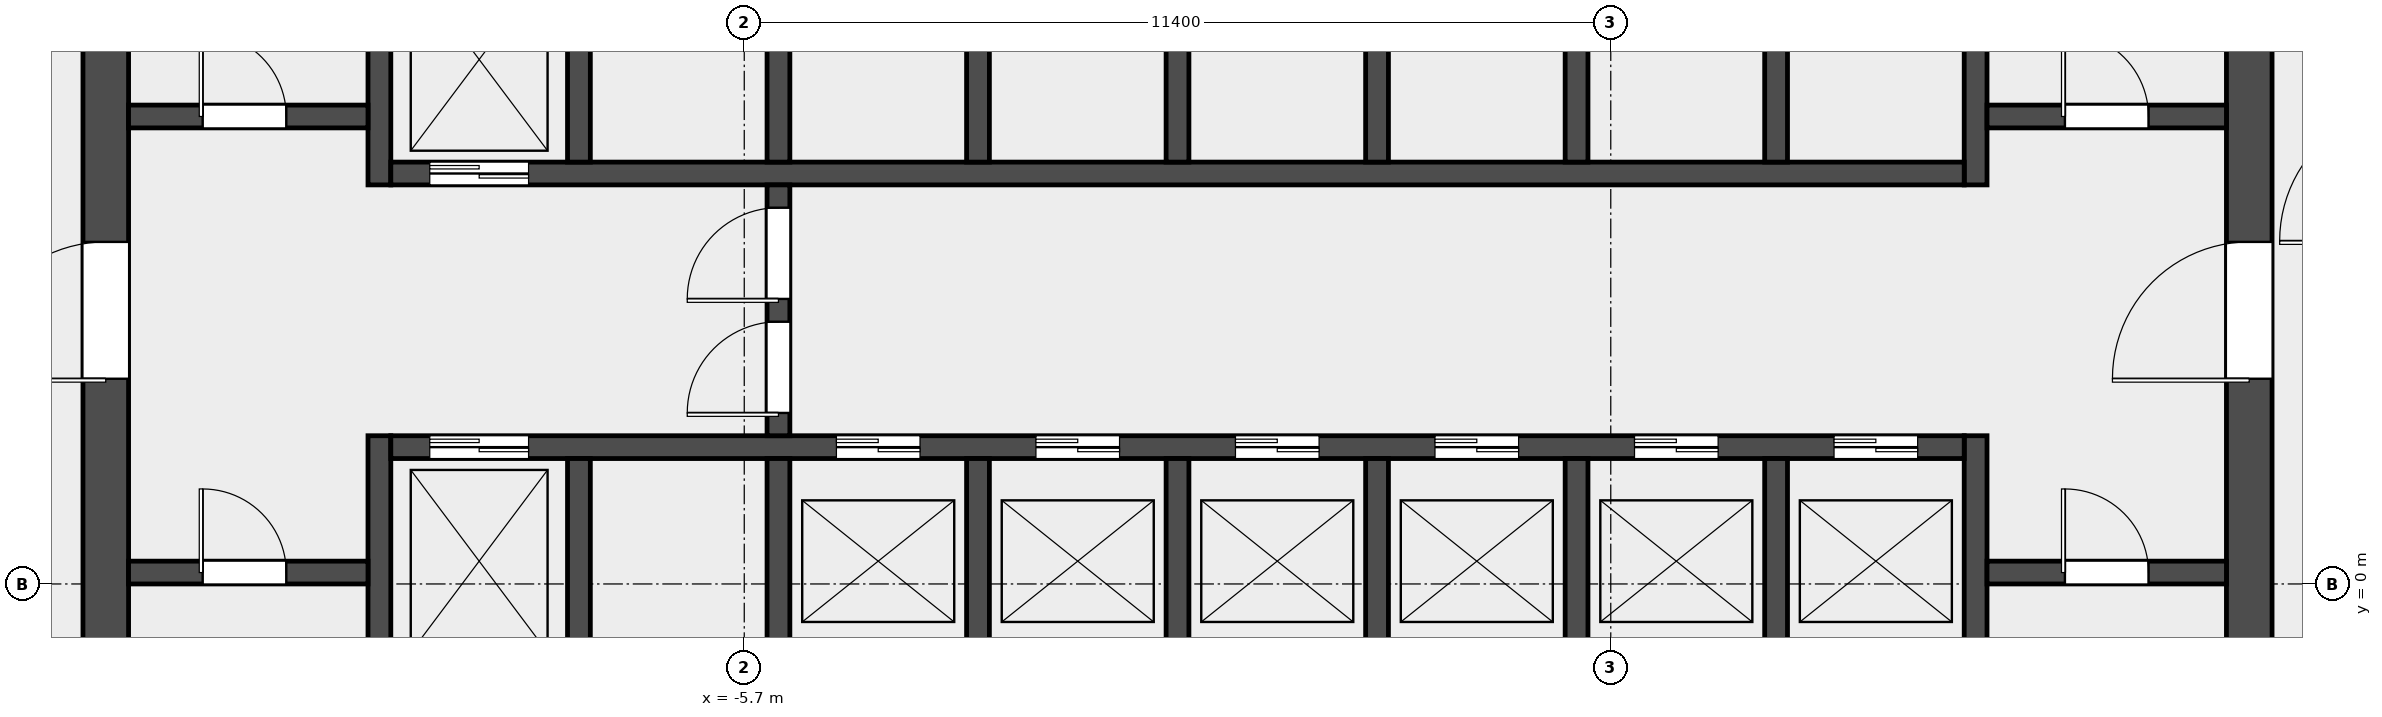
"""IFC4 building model, lengths in metres.
Left out: names, types, materials, properties, quantities, classifications, styles, units other than length and angle.
Written with IfcOpenShell. Run it as: python <this file> out.ifc"""

import sys

from ifc_helpers import new_model, si_unit, direction, frame, frame_2d, origin, place, context, subcontext, project, spatial, rectangle, extrude, element, fill, save


model = new_model("IFC4")
c1 = context("Model", 3, precision=1e-05, world=origin(), true_north=direction((0.0, 1.0)))
c2 = subcontext(c1, "Body", "Model", "MODEL_VIEW")
j1 = project(units=[si_unit("LENGTHUNIT", "METRE"), si_unit("PLANEANGLEUNIT", "RADIAN")], contexts=[c1])
p1 = place(None, origin())
s1 = spatial("IfcSite", under=j1, at=p1, CompositionType="ELEMENT")
p2 = place(p1, origin())
s2 = spatial("IfcBuilding", under=s1, at=p2, CompositionType="ELEMENT")
p3 = place(p2, frame((0.0, 0.0, 108.1)))
s3 = spatial("IfcBuildingStorey", under=s2, at=p3, CompositionType="ELEMENT", Elevation=108.1)
p4 = place(p3, frame((-14.1, -6.6, 0.0), z_axis=(0.0, 0.0, 1.0), x_axis=(0.0, 1.0, 0.0)))
e1 = element("IfcWall", 1, at=p4, inside=s3, PredefinedType="SHEAR", context=c2, shape_type="SweptSolid", body=[
    extrude(rectangle(XDim=19.5, YDim=0.6, at=frame_2d((9.75, 0.0))), origin(), (0.0, 0.0, 1.0), 4.2),
])
p5 = place(p4, frame((9.3, 0.0, 0.0)))
e2 = element("IfcOpeningElement", 2, at=p5, cuts=e1, PredefinedType="OPENING", context=c2, shape_type="SweptSolid", body=[
    extrude(rectangle(XDim=1.8, YDim=2.1, at=frame_2d((0.9, 1.05))), frame((0.0, 0.312, 0.0), z_axis=(0.0, -1.0, 0.0), x_axis=(1.0, 0.0, 0.0)), (0.0, 0.0, 1.0), 0.624),
])
p6 = place(p3, frame((14.1, -6.6, 0.0), z_axis=(0.0, 0.0, 1.0), x_axis=(0.0, 1.0, 0.0)))
e3 = element("IfcWall", 3, at=p6, inside=s3, PredefinedType="SHEAR", context=c2, shape_type="SweptSolid", body=[
    extrude(rectangle(XDim=19.5, YDim=0.6, at=frame_2d((9.75, 0.0))), origin(), (0.0, 0.0, 1.0), 4.2),
])
p7 = place(p6, frame((9.3, 0.0, 0.0)))
e4 = element("IfcOpeningElement", 4, at=p7, cuts=e3, PredefinedType="OPENING", context=c2, shape_type="SweptSolid", body=[
    extrude(rectangle(XDim=1.8, YDim=2.1, at=frame_2d((0.9, 1.05))), frame((0.0, 0.312, 0.0), z_axis=(0.0, -1.0, 0.0), x_axis=(1.0, 0.0, 0.0)), (0.0, 0.0, 1.0), 0.624),
])
p8 = place(p3, frame((-10.5, -6.6, 0.0), z_axis=(0.0, 0.0, 1.0), x_axis=(0.0, 1.0, 0.0)))
e5 = element("IfcWall", 5, at=p8, inside=s3, PredefinedType="SHEAR", context=c2, shape_type="SweptSolid", body=[
    extrude(rectangle(XDim=8.55, YDim=0.3, at=frame_2d((4.275, 0.0))), origin(), (0.0, 0.0, 1.0), 4.2),
])
p9 = place(p3, frame((-10.5, 5.25, 0.0), z_axis=(0.0, 0.0, 1.0), x_axis=(0.0, 1.0, 0.0)))
e6 = element("IfcWall", 6, at=p9, inside=s3, PredefinedType="SHEAR", context=c2, shape_type="SweptSolid", body=[
    extrude(rectangle(XDim=7.65, YDim=0.3, at=frame_2d((3.825, 0.0))), origin(), (0.0, 0.0, 1.0), 4.2),
])
p10 = place(p3, frame((10.5, -6.6, 0.0), z_axis=(0.0, 0.0, 1.0), x_axis=(0.0, 1.0, 0.0)))
e7 = element("IfcWall", 7, at=p10, inside=s3, PredefinedType="SHEAR", context=c2, shape_type="SweptSolid", body=[
    extrude(rectangle(XDim=8.55, YDim=0.3, at=frame_2d((4.275, 0.0))), origin(), (0.0, 0.0, 1.0), 4.2),
])
p11 = place(p3, frame((10.5, 5.25, 0.0), z_axis=(0.0, 0.0, 1.0), x_axis=(0.0, 1.0, 0.0)))
e8 = element("IfcWall", 8, at=p11, inside=s3, PredefinedType="SHEAR", context=c2, shape_type="SweptSolid", body=[
    extrude(rectangle(XDim=7.65, YDim=0.3, at=frame_2d((3.825, 0.0))), origin(), (0.0, 0.0, 1.0), 4.2),
])
p12 = place(p3, frame((-13.8, 0.15, 0.0), z_axis=(0.0, 0.0, 1.0), x_axis=(1.0, 0.0, 0.0)))
e9 = element("IfcWall", 9, at=p12, inside=s3, PredefinedType="SOLIDWALL", context=c2, shape_type="SweptSolid", body=[
    extrude(rectangle(XDim=3.15, YDim=0.3, at=frame_2d((1.575, 0.0))), origin(), (0.0, 0.0, 1.0), 4.2),
])
p13 = place(p12, frame((0.975, 0.0, 0.0)))
e10 = element("IfcOpeningElement", 10, at=p13, cuts=e9, PredefinedType="OPENING", context=c2, shape_type="SweptSolid", body=[
    extrude(rectangle(XDim=1.1, YDim=2.1, at=frame_2d((0.55, 1.05))), frame((0.0, 0.162, 0.0), z_axis=(0.0, -1.0, 0.0), x_axis=(1.0, 0.0, 0.0)), (0.0, 0.0, 1.0), 0.324),
])
p14 = place(p3, frame((-13.8, 6.15, 0.0), z_axis=(0.0, 0.0, 1.0), x_axis=(1.0, 0.0, 0.0)))
e11 = element("IfcWall", 11, at=p14, inside=s3, PredefinedType="SOLIDWALL", context=c2, shape_type="SweptSolid", body=[
    extrude(rectangle(XDim=3.15, YDim=0.3, at=frame_2d((1.575, 0.0))), origin(), (0.0, 0.0, 1.0), 4.2),
])
p15 = place(p14, frame((0.975, 0.0, 0.0)))
e12 = element("IfcOpeningElement", 12, at=p15, cuts=e11, PredefinedType="OPENING", context=c2, shape_type="SweptSolid", body=[
    extrude(rectangle(XDim=1.1, YDim=2.1, at=frame_2d((0.55, 1.05))), frame((0.0, 0.162, 0.0), z_axis=(0.0, -1.0, 0.0), x_axis=(1.0, 0.0, 0.0)), (0.0, 0.0, 1.0), 0.324),
])
p16 = place(p3, frame((10.65, 0.15, 0.0), z_axis=(0.0, 0.0, 1.0), x_axis=(1.0, 0.0, 0.0)))
e13 = element("IfcWall", 13, at=p16, inside=s3, PredefinedType="SOLIDWALL", context=c2, shape_type="SweptSolid", body=[
    extrude(rectangle(XDim=3.15, YDim=0.3, at=frame_2d((1.575, 0.0))), origin(), (0.0, 0.0, 1.0), 4.2),
])
p17 = place(p16, frame((1.025, 0.0, 0.0)))
e14 = element("IfcOpeningElement", 14, at=p17, cuts=e13, PredefinedType="OPENING", context=c2, shape_type="SweptSolid", body=[
    extrude(rectangle(XDim=1.1, YDim=2.1, at=frame_2d((0.55, 1.05))), frame((0.0, 0.162, 0.0), z_axis=(0.0, -1.0, 0.0), x_axis=(1.0, 0.0, 0.0)), (0.0, 0.0, 1.0), 0.324),
])
p18 = place(p3, frame((10.65, 6.15, 0.0), z_axis=(0.0, 0.0, 1.0), x_axis=(1.0, 0.0, 0.0)))
e15 = element("IfcWall", 15, at=p18, inside=s3, PredefinedType="SOLIDWALL", context=c2, shape_type="SweptSolid", body=[
    extrude(rectangle(XDim=3.15, YDim=0.3, at=frame_2d((1.575, 0.0))), origin(), (0.0, 0.0, 1.0), 4.2),
])
p19 = place(p18, frame((1.025, 0.0, 0.0)))
e16 = element("IfcOpeningElement", 16, at=p19, cuts=e15, PredefinedType="OPENING", context=c2, shape_type="SweptSolid", body=[
    extrude(rectangle(XDim=1.1, YDim=2.1, at=frame_2d((0.55, 1.05))), frame((0.0, 0.162, 0.0), z_axis=(0.0, -1.0, 0.0), x_axis=(1.0, 0.0, 0.0)), (0.0, 0.0, 1.0), 0.324),
])
p20 = place(p3, frame((-10.35, 1.8, 0.0), z_axis=(0.0, 0.0, 1.0), x_axis=(1.0, 0.0, 0.0)))
e17 = element("IfcWall", 17, at=p20, inside=s3, PredefinedType="SOLIDWALL", context=c2, shape_type="SweptSolid", body=[
    extrude(rectangle(XDim=20.7, YDim=0.3, at=frame_2d((10.35, 0.0))), origin(), (0.0, 0.0, 1.0), 4.2),
])
p21 = place(p20, frame((0.512, 0.0, 0.0)))
e18 = element("IfcOpeningElement", 18, at=p21, cuts=e17, PredefinedType="OPENING", context=c2, shape_type="SweptSolid", body=[
    extrude(rectangle(XDim=1.3, YDim=2.1, at=frame_2d((0.65, 1.05))), frame((0.0, 0.162, 0.0), z_axis=(0.0, -1.0, 0.0), x_axis=(1.0, 0.0, 0.0)), (0.0, 0.0, 1.0), 0.324),
])
p22 = place(p20, frame((5.863, 0.0, 0.0)))
e19 = element("IfcOpeningElement", 19, at=p22, cuts=e17, PredefinedType="OPENING", context=c2, shape_type="SweptSolid", body=[
    extrude(rectangle(XDim=1.1, YDim=2.1, at=frame_2d((0.55, 1.05))), frame((0.0, 0.162, 0.0), z_axis=(0.0, -1.0, 0.0), x_axis=(1.0, 0.0, 0.0)), (0.0, 0.0, 1.0), 0.324),
])
p23 = place(p20, frame((8.488, 0.0, 0.0)))
e20 = element("IfcOpeningElement", 20, at=p23, cuts=e17, PredefinedType="OPENING", context=c2, shape_type="SweptSolid", body=[
    extrude(rectangle(XDim=1.1, YDim=2.1, at=frame_2d((0.55, 1.05))), frame((0.0, 0.162, 0.0), z_axis=(0.0, -1.0, 0.0), x_axis=(1.0, 0.0, 0.0)), (0.0, 0.0, 1.0), 0.324),
])
p24 = place(p20, frame((11.113, 0.0, 0.0)))
e21 = element("IfcOpeningElement", 21, at=p24, cuts=e17, PredefinedType="OPENING", context=c2, shape_type="SweptSolid", body=[
    extrude(rectangle(XDim=1.1, YDim=2.1, at=frame_2d((0.55, 1.05))), frame((0.0, 0.162, 0.0), z_axis=(0.0, -1.0, 0.0), x_axis=(1.0, 0.0, 0.0)), (0.0, 0.0, 1.0), 0.324),
])
p25 = place(p20, frame((13.738, 0.0, 0.0)))
e22 = element("IfcOpeningElement", 22, at=p25, cuts=e17, PredefinedType="OPENING", context=c2, shape_type="SweptSolid", body=[
    extrude(rectangle(XDim=1.1, YDim=2.1, at=frame_2d((0.55, 1.05))), frame((0.0, 0.162, 0.0), z_axis=(0.0, -1.0, 0.0), x_axis=(1.0, 0.0, 0.0)), (0.0, 0.0, 1.0), 0.324),
])
p26 = place(p20, frame((16.363, 0.0, 0.0)))
e23 = element("IfcOpeningElement", 23, at=p26, cuts=e17, PredefinedType="OPENING", context=c2, shape_type="SweptSolid", body=[
    extrude(rectangle(XDim=1.1, YDim=2.1, at=frame_2d((0.55, 1.05))), frame((0.0, 0.162, 0.0), z_axis=(0.0, -1.0, 0.0), x_axis=(1.0, 0.0, 0.0)), (0.0, 0.0, 1.0), 0.324),
])
p27 = place(p20, frame((18.988, 0.0, 0.0)))
e24 = element("IfcOpeningElement", 24, at=p27, cuts=e17, PredefinedType="OPENING", context=c2, shape_type="SweptSolid", body=[
    extrude(rectangle(XDim=1.1, YDim=2.1, at=frame_2d((0.55, 1.05))), frame((0.0, 0.162, 0.0), z_axis=(0.0, -1.0, 0.0), x_axis=(1.0, 0.0, 0.0)), (0.0, 0.0, 1.0), 0.324),
])
p28 = place(p3, frame((-10.35, 5.4, 0.0), z_axis=(0.0, 0.0, 1.0), x_axis=(1.0, 0.0, 0.0)))
e25 = element("IfcWall", 25, at=p28, inside=s3, PredefinedType="SOLIDWALL", context=c2, shape_type="SweptSolid", body=[
    extrude(rectangle(XDim=20.7, YDim=0.3, at=frame_2d((10.35, 0.0))), origin(), (0.0, 0.0, 1.0), 4.2),
])
p29 = place(p28, frame((0.512, 0.0, 0.0)))
e26 = element("IfcOpeningElement", 26, at=p29, cuts=e25, PredefinedType="OPENING", context=c2, shape_type="SweptSolid", body=[
    extrude(rectangle(XDim=1.3, YDim=2.1, at=frame_2d((0.65, 1.05))), frame((0.0, 0.162, 0.0), z_axis=(0.0, -1.0, 0.0), x_axis=(1.0, 0.0, 0.0)), (0.0, 0.0, 1.0), 0.324),
])
for number, where, z_axis, x_axis in (
    (27, (-7.875, -1.05, 0.0), (0.0, 0.0, 1.0), (0.0, 1.0, 0.0)),
    (28, (-5.25, -1.05, 0.0), (0.0, 0.0, 1.0), (0.0, 1.0, 0.0)),
    (29, (-2.625, -1.05, 0.0), (0.0, 0.0, 1.0), (0.0, 1.0, 0.0)),
    (30, (0.0, -1.05, 0.0), (0.0, 0.0, 1.0), (0.0, 1.0, 0.0)),
    (31, (2.625, -1.05, 0.0), (0.0, 0.0, 1.0), (0.0, 1.0, 0.0)),
    (32, (5.25, -1.05, 0.0), (0.0, 0.0, 1.0), (0.0, 1.0, 0.0)),
    (33, (7.875, -1.05, 0.0), (0.0, 0.0, 1.0), (0.0, 1.0, 0.0)),
    (34, (-7.875, 5.55, 0.0), (0.0, 0.0, 1.0), (0.0, 1.0, 0.0)),
    (35, (-5.25, 5.55, 0.0), (0.0, 0.0, 1.0), (0.0, 1.0, 0.0)),
    (36, (-2.625, 5.55, 0.0), (0.0, 0.0, 1.0), (0.0, 1.0, 0.0)),
    (37, (0.0, 5.55, 0.0), (0.0, 0.0, 1.0), (0.0, 1.0, 0.0)),
    (38, (2.625, 5.55, 0.0), (0.0, 0.0, 1.0), (0.0, 1.0, 0.0)),
    (39, (5.25, 5.55, 0.0), (0.0, 0.0, 1.0), (0.0, 1.0, 0.0)),
    (40, (7.875, 5.55, 0.0), (0.0, 0.0, 1.0), (0.0, 1.0, 0.0)),
):
    element("IfcWall", number, at=place(p3, frame(where, z_axis=z_axis, x_axis=x_axis)), inside=s3, PredefinedType="SOLIDWALL", context=c2, shape_type="SweptSolid", body=[
        extrude(rectangle(XDim=2.7, YDim=0.3, at=frame_2d((1.35, 0.0))), origin(), (0.0, 0.0, 1.0), 4.2),
    ])
p30 = place(p3, frame((-5.25, 1.95, 0.0), z_axis=(0.0, 0.0, 1.0), x_axis=(0.0, 1.0, 0.0)))
e41 = element("IfcWall", 41, at=p30, inside=s3, PredefinedType="SOLIDWALL", context=c2, shape_type="SweptSolid", body=[
    extrude(rectangle(XDim=3.3, YDim=0.3, at=frame_2d((1.65, 0.0))), origin(), (0.0, 0.0, 1.0), 4.2),
])
p31 = place(p30, frame((0.3, 0.0, 0.0)))
e42 = element("IfcOpeningElement", 42, at=p31, cuts=e41, PredefinedType="OPENING", context=c2, shape_type="SweptSolid", body=[
    extrude(rectangle(XDim=1.2, YDim=2.1, at=frame_2d((0.6, 1.05))), frame((0.0, 0.162, 0.0), z_axis=(0.0, -1.0, 0.0), x_axis=(1.0, 0.0, 0.0)), (0.0, 0.0, 1.0), 0.324),
])
p32 = place(p30, frame((1.8, 0.0, 0.0)))
e43 = element("IfcOpeningElement", 43, at=p32, cuts=e41, PredefinedType="OPENING", context=c2, shape_type="SweptSolid", body=[
    extrude(rectangle(XDim=1.2, YDim=2.1, at=frame_2d((0.6, 1.05))), frame((0.0, 0.162, 0.0), z_axis=(0.0, -1.0, 0.0), x_axis=(1.0, 0.0, 0.0)), (0.0, 0.0, 1.0), 0.324),
])
p33 = place(p13, origin())
e44 = element("IfcDoor", 44, at=p33, inside=s3, OperationType="SINGLE_SWING_LEFT", PredefinedType="DOOR", context=c2, shape_type="SweptSolid", body=[
    extrude(rectangle(XDim=1.1, YDim=2.1, at=frame_2d((0.55, 1.05))), frame((0.0, 0.025, 0.0), z_axis=(0.0, -1.0, 0.0), x_axis=(1.0, 0.0, 0.0)), (0.0, 0.0, 1.0), 0.05),
])
fill(e10, e44)
p34 = place(p15, origin())
e45 = element("IfcDoor", 45, at=p34, inside=s3, OperationType="SINGLE_SWING_LEFT", PredefinedType="DOOR", context=c2, shape_type="SweptSolid", body=[
    extrude(rectangle(XDim=1.1, YDim=2.1, at=frame_2d((0.55, 1.05))), frame((0.0, 0.025, 0.0), z_axis=(0.0, -1.0, 0.0), x_axis=(1.0, 0.0, 0.0)), (0.0, 0.0, 1.0), 0.05),
])
fill(e12, e45)
p35 = place(p17, origin())
e46 = element("IfcDoor", 46, at=p35, inside=s3, OperationType="SINGLE_SWING_RIGHT", PredefinedType="DOOR", context=c2, shape_type="SweptSolid", body=[
    extrude(rectangle(XDim=1.1, YDim=2.1, at=frame_2d((0.55, 1.05))), frame((0.0, 0.025, 0.0), z_axis=(0.0, -1.0, 0.0), x_axis=(1.0, 0.0, 0.0)), (0.0, 0.0, 1.0), 0.05),
])
fill(e14, e46)
p36 = place(p19, origin())
e47 = element("IfcDoor", 47, at=p36, inside=s3, OperationType="SINGLE_SWING_RIGHT", PredefinedType="DOOR", context=c2, shape_type="SweptSolid", body=[
    extrude(rectangle(XDim=1.1, YDim=2.1, at=frame_2d((0.55, 1.05))), frame((0.0, 0.025, 0.0), z_axis=(0.0, -1.0, 0.0), x_axis=(1.0, 0.0, 0.0)), (0.0, 0.0, 1.0), 0.05),
])
fill(e16, e47)
p37 = place(p5, origin())
e48 = element("IfcDoor", 48, at=p37, inside=s3, OperationType="DOUBLE_DOOR_SINGLE_SWING", PredefinedType="DOOR", context=c2, shape_type="SweptSolid", body=[
    extrude(rectangle(XDim=1.8, YDim=2.1, at=frame_2d((0.9, 1.05))), frame((0.0, 0.025, 0.0), z_axis=(0.0, -1.0, 0.0), x_axis=(1.0, 0.0, 0.0)), (0.0, 0.0, 1.0), 0.05),
])
fill(e2, e48)
p38 = place(p7, origin())
e49 = element("IfcDoor", 49, at=p38, inside=s3, OperationType="DOUBLE_DOOR_SINGLE_SWING", PredefinedType="DOOR", context=c2, shape_type="SweptSolid", body=[
    extrude(rectangle(XDim=1.8, YDim=2.1, at=frame_2d((0.9, 1.05))), frame((0.0, 0.025, 0.0), z_axis=(0.0, -1.0, 0.0), x_axis=(1.0, 0.0, 0.0)), (0.0, 0.0, 1.0), 0.05),
])
fill(e4, e49)
p39 = place(p31, origin())
e50 = element("IfcDoor", 50, at=p39, inside=s3, OperationType="SINGLE_SWING_LEFT", PredefinedType="DOOR", context=c2, shape_type="SweptSolid", body=[
    extrude(rectangle(XDim=1.2, YDim=2.1, at=frame_2d((0.6, 1.05))), frame((0.0, 0.025, 0.0), z_axis=(0.0, -1.0, 0.0), x_axis=(1.0, 0.0, 0.0)), (0.0, 0.0, 1.0), 0.05),
])
fill(e42, e50)
p40 = place(p32, origin())
e51 = element("IfcDoor", 51, at=p40, inside=s3, OperationType="SINGLE_SWING_RIGHT", PredefinedType="DOOR", context=c2, shape_type="SweptSolid", body=[
    extrude(rectangle(XDim=1.2, YDim=2.1, at=frame_2d((0.6, 1.05))), frame((0.0, 0.025, 0.0), z_axis=(0.0, -1.0, 0.0), x_axis=(1.0, 0.0, 0.0)), (0.0, 0.0, 1.0), 0.05),
])
fill(e43, e51)
p41 = place(p21, origin())
e52 = element("IfcDoor", 52, at=p41, inside=s3, OperationType="DOUBLE_DOOR_SLIDING", PredefinedType="DOOR", context=c2, shape_type="SweptSolid", body=[
    extrude(rectangle(XDim=1.3, YDim=2.1, at=frame_2d((0.65, 1.05))), frame((0.0, 0.025, 0.0), z_axis=(0.0, -1.0, 0.0), x_axis=(1.0, 0.0, 0.0)), (0.0, 0.0, 1.0), 0.05),
])
fill(e18, e52)
p42 = place(p22, origin())
e53 = element("IfcDoor", 53, at=p42, inside=s3, OperationType="DOUBLE_DOOR_SLIDING", PredefinedType="DOOR", context=c2, shape_type="SweptSolid", body=[
    extrude(rectangle(XDim=1.1, YDim=2.1, at=frame_2d((0.55, 1.05))), frame((0.0, 0.025, 0.0), z_axis=(0.0, -1.0, 0.0), x_axis=(1.0, 0.0, 0.0)), (0.0, 0.0, 1.0), 0.05),
])
fill(e19, e53)
p43 = place(p23, origin())
e54 = element("IfcDoor", 54, at=p43, inside=s3, OperationType="DOUBLE_DOOR_SLIDING", PredefinedType="DOOR", context=c2, shape_type="SweptSolid", body=[
    extrude(rectangle(XDim=1.1, YDim=2.1, at=frame_2d((0.55, 1.05))), frame((0.0, 0.025, 0.0), z_axis=(0.0, -1.0, 0.0), x_axis=(1.0, 0.0, 0.0)), (0.0, 0.0, 1.0), 0.05),
])
fill(e20, e54)
p44 = place(p24, origin())
e55 = element("IfcDoor", 55, at=p44, inside=s3, OperationType="DOUBLE_DOOR_SLIDING", PredefinedType="DOOR", context=c2, shape_type="SweptSolid", body=[
    extrude(rectangle(XDim=1.1, YDim=2.1, at=frame_2d((0.55, 1.05))), frame((0.0, 0.025, 0.0), z_axis=(0.0, -1.0, 0.0), x_axis=(1.0, 0.0, 0.0)), (0.0, 0.0, 1.0), 0.05),
])
fill(e21, e55)
p45 = place(p25, origin())
e56 = element("IfcDoor", 56, at=p45, inside=s3, OperationType="DOUBLE_DOOR_SLIDING", PredefinedType="DOOR", context=c2, shape_type="SweptSolid", body=[
    extrude(rectangle(XDim=1.1, YDim=2.1, at=frame_2d((0.55, 1.05))), frame((0.0, 0.025, 0.0), z_axis=(0.0, -1.0, 0.0), x_axis=(1.0, 0.0, 0.0)), (0.0, 0.0, 1.0), 0.05),
])
fill(e22, e56)
p46 = place(p26, origin())
e57 = element("IfcDoor", 57, at=p46, inside=s3, OperationType="DOUBLE_DOOR_SLIDING", PredefinedType="DOOR", context=c2, shape_type="SweptSolid", body=[
    extrude(rectangle(XDim=1.1, YDim=2.1, at=frame_2d((0.55, 1.05))), frame((0.0, 0.025, 0.0), z_axis=(0.0, -1.0, 0.0), x_axis=(1.0, 0.0, 0.0)), (0.0, 0.0, 1.0), 0.05),
])
fill(e23, e57)
p47 = place(p27, origin())
e58 = element("IfcDoor", 58, at=p47, inside=s3, OperationType="DOUBLE_DOOR_SLIDING", PredefinedType="DOOR", context=c2, shape_type="SweptSolid", body=[
    extrude(rectangle(XDim=1.1, YDim=2.1, at=frame_2d((0.55, 1.05))), frame((0.0, 0.025, 0.0), z_axis=(0.0, -1.0, 0.0), x_axis=(1.0, 0.0, 0.0)), (0.0, 0.0, 1.0), 0.05),
])
fill(e24, e58)
p48 = place(p29, origin())
e59 = element("IfcDoor", 59, at=p48, inside=s3, OperationType="DOUBLE_DOOR_SLIDING", PredefinedType="DOOR", context=c2, shape_type="SweptSolid", body=[
    extrude(rectangle(XDim=1.3, YDim=2.1, at=frame_2d((0.65, 1.05))), frame((0.0, 0.025, 0.0), z_axis=(0.0, -1.0, 0.0), x_axis=(1.0, 0.0, 0.0)), (0.0, 0.0, 1.0), 0.05),
])
fill(e26, e59)
save(model, sys.argv[1])
